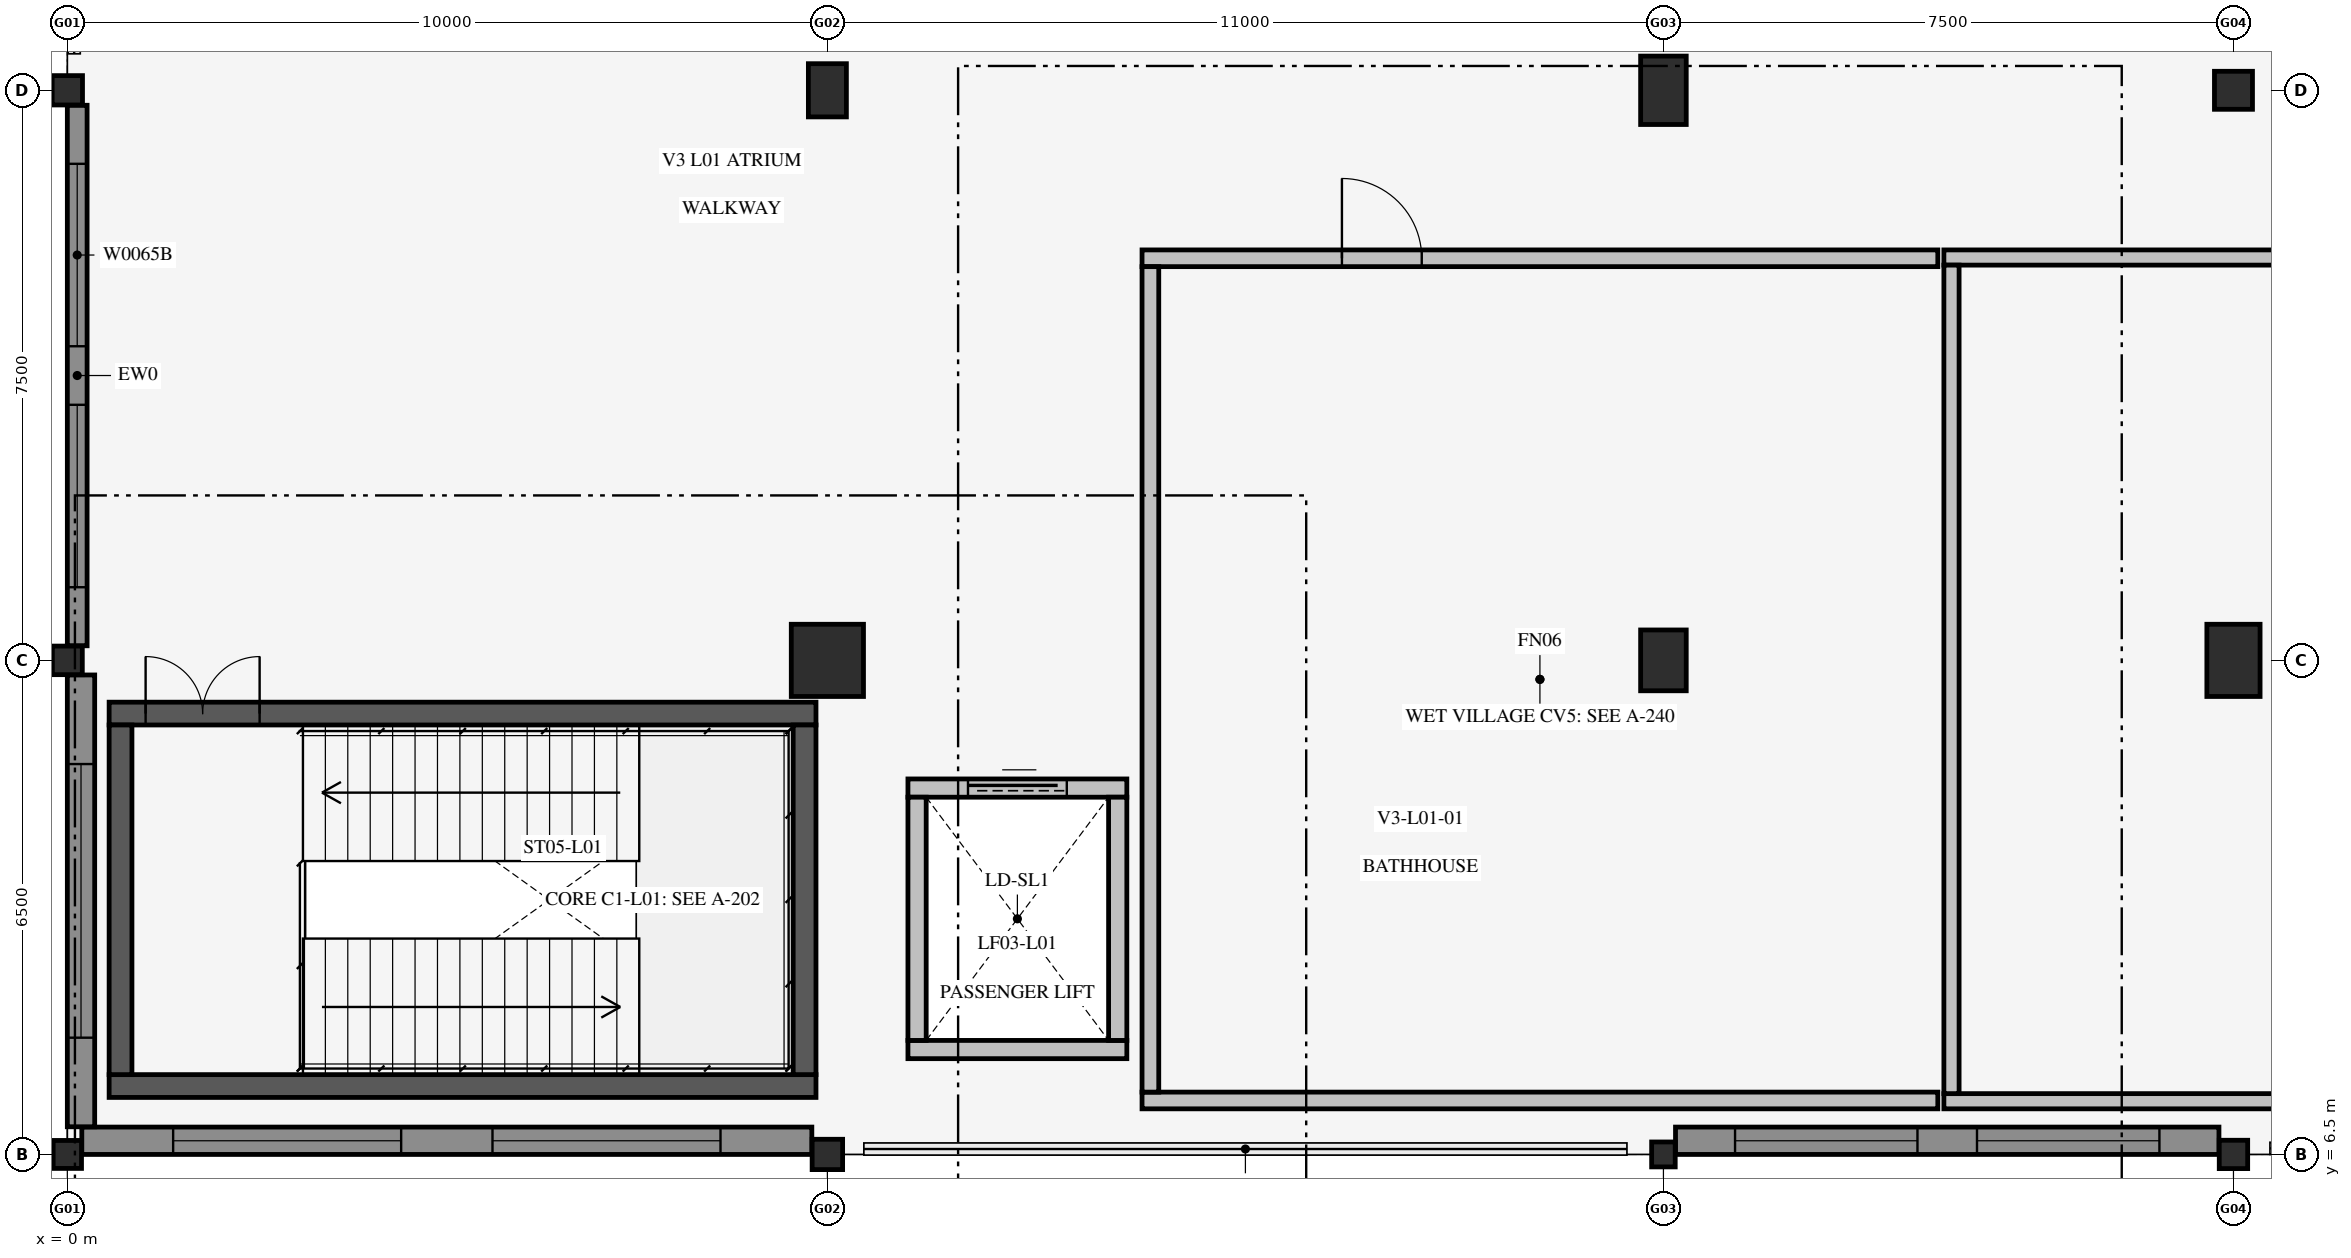
"""IFC4 building model, lengths in metres.
Left out: names, types, materials, properties, quantities, classifications, styles, units other than length and angle.
Written with IfcOpenShell. Run it as: python <this file> out.ifc"""

import sys

from ifc_helpers import new_model, si_unit, direction, frame, frame_2d, origin, origin_2d, place, context, subcontext, project, spatial, rectangle, circle, i_section, extrude, element, fill, save


model = new_model("IFC4")
c1 = context("Model", 3, precision=1e-05, world=origin(), true_north=direction((0.0, 1.0)))
c2 = subcontext(c1, "Body", "Model", "MODEL_VIEW")
j1 = project(units=[si_unit("LENGTHUNIT", "METRE"), si_unit("PLANEANGLEUNIT", "RADIAN")], contexts=[c1])
p1 = place(None, origin())
s1 = spatial("IfcSite", under=j1, at=p1, CompositionType="ELEMENT")
p2 = place(p1, origin())
s2 = spatial("IfcBuilding", under=s1, at=p2, CompositionType="ELEMENT")
p3 = place(p2, frame((0.0, 0.0, 5.4)))
s3 = spatial("IfcBuildingStorey", under=s2, at=p3, CompositionType="ELEMENT", Elevation=5.4)
p4 = place(p3, frame((0.55, 7.4, 0.0), z_axis=(0.0, 0.0, 1.0), x_axis=(1.0, 0.0, 0.0)))
e1 = element("IfcWall", 1, at=p4, inside=s3, PredefinedType="SHEAR", context=c2, shape_type="SweptSolid", body=[
    extrude(rectangle(XDim=9.3, YDim=0.3, at=frame_2d((4.65, 0.0))), origin(), (0.0, 0.0, 1.0), 4.635),
])
p5 = place(p3, frame((0.55, 12.3, 0.0), z_axis=(0.0, 0.0, 1.0), x_axis=(1.0, 0.0, 0.0)))
e2 = element("IfcWall", 2, at=p5, inside=s3, PredefinedType="SHEAR", context=c2, shape_type="SweptSolid", body=[
    extrude(rectangle(XDim=9.3, YDim=0.3, at=frame_2d((4.65, 0.0))), origin(), (0.0, 0.0, 1.0), 4.635),
])
p6 = place(p5, frame((0.48, 0.0, 0.0)))
e3 = element("IfcOpeningElement", 3, at=p6, cuts=e2, PredefinedType="OPENING", context=c2, shape_type="SweptSolid", body=[
    extrude(rectangle(XDim=1.5, YDim=2.3, at=frame_2d((0.75, 1.15))), frame((0.0, 0.162, 0.0), z_axis=(0.0, -1.0, 0.0), x_axis=(1.0, 0.0, 0.0)), (0.0, 0.0, 1.0), 0.324),
])
for number, where, z_axis, x_axis in (
    (4, (0.7, 7.55, 0.0), (0.0, 0.0, 1.0), (0.0, 1.0, 0.0)),
    (5, (9.7, 7.55, 0.0), (0.0, 0.0, 1.0), (0.0, 1.0, 0.0)),
):
    element("IfcWall", number, at=place(p3, frame(where, z_axis=z_axis, x_axis=x_axis)), inside=s3, PredefinedType="SHEAR", context=c2, shape_type="SweptSolid", body=[
        extrude(rectangle(XDim=4.6, YDim=0.3, at=frame_2d((2.3, 0.0))), origin(), (0.0, 0.0, 1.0), 4.635),
    ])
p7 = place(p3, frame((11.06, 7.88, 0.0), z_axis=(0.0, 0.0, 1.0), x_axis=(1.0, 0.0, 0.0)))
e6 = element("IfcWall", 6, at=p7, inside=s3, PredefinedType="SOLIDWALL", context=c2, shape_type="SweptSolid", body=[
    extrude(rectangle(XDim=2.88, YDim=0.24, at=frame_2d((1.44, 0.0))), origin(), (0.0, 0.0, 1.0), 3.45),
])
p8 = place(p3, frame((11.06, 11.32, 0.0), z_axis=(0.0, 0.0, 1.0), x_axis=(1.0, 0.0, 0.0)))
e7 = element("IfcWall", 7, at=p8, inside=s3, PredefinedType="SOLIDWALL", context=c2, shape_type="SweptSolid", body=[
    extrude(rectangle(XDim=2.88, YDim=0.24, at=frame_2d((1.44, 0.0))), origin(), (0.0, 0.0, 1.0), 3.45),
])
p9 = place(p8, frame((0.79, 0.0, 0.0)))
e8 = element("IfcOpeningElement", 8, at=p9, cuts=e7, PredefinedType="OPENING", context=c2, shape_type="SweptSolid", body=[
    extrude(rectangle(XDim=1.3, YDim=2.25, at=frame_2d((0.65, 1.125))), frame((0.0, 0.132, 0.0), z_axis=(0.0, -1.0, 0.0), x_axis=(1.0, 0.0, 0.0)), (0.0, 0.0, 1.0), 0.264),
])
for number, where, z_axis, x_axis in (
    (9, (11.18, 8.0, 0.0), (0.0, 0.0, 1.0), (0.0, 1.0, 0.0)),
    (10, (13.82, 8.0, 0.0), (0.0, 0.0, 1.0), (0.0, 1.0, 0.0)),
):
    element("IfcWall", number, at=place(p3, frame(where, z_axis=z_axis, x_axis=x_axis)), inside=s3, PredefinedType="SOLIDWALL", context=c2, shape_type="SweptSolid", body=[
        extrude(rectangle(XDim=3.2, YDim=0.24, at=frame_2d((1.6, 0.0))), origin(), (0.0, 0.0, 1.0), 3.45),
    ])
p10 = place(p3, frame((0.0, 6.5, 0.0), z_axis=(0.0, 0.0, 1.0), x_axis=(1.0, 0.0, 0.0)))
e11 = element("IfcColumn", 11, at=p10, inside=s3, PredefinedType="COLUMN", context=c2, shape_type="SweptSolid", body=[
    extrude(i_section(OverallWidth=0.373, OverallDepth=0.368, WebThickness=0.015, FlangeThickness=0.024, FilletRadius=0.014, at=origin_2d()), origin(), (0.0, 0.0, 1.0), 4.6),
])
p11 = place(p3, frame((0.0, 13.0, 0.0), z_axis=(0.0, 0.0, 1.0), x_axis=(1.0, 0.0, 0.0)))
e12 = element("IfcColumn", 12, at=p11, inside=s3, PredefinedType="COLUMN", context=c2, shape_type="SweptSolid", body=[
    extrude(i_section(OverallWidth=0.394, OverallDepth=0.376, WebThickness=0.017, FlangeThickness=0.028, FilletRadius=0.014, at=origin_2d()), origin(), (0.0, 0.0, 1.0), 4.6),
])
p12 = place(p3, frame((0.0, 20.5, 0.0), z_axis=(0.0, 0.0, 1.0), x_axis=(1.0, 0.0, 0.0)))
e13 = element("IfcColumn", 13, at=p12, inside=s3, PredefinedType="COLUMN", context=c2, shape_type="SweptSolid", body=[
    extrude(i_section(OverallWidth=0.399, OverallDepth=0.386, WebThickness=0.021, FlangeThickness=0.033, FilletRadius=0.014, at=origin_2d()), origin(), (0.0, 0.0, 1.0), 4.6),
])
p13 = place(p3, frame((10.0, 6.5, 0.0), z_axis=(0.0, 0.0, 1.0), x_axis=(1.0, 0.0, 0.0)))
e14 = element("IfcColumn", 14, at=p13, inside=s3, PredefinedType="COLUMN", context=c2, shape_type="SweptSolid", body=[
    extrude(i_section(OverallWidth=0.401, OverallDepth=0.399, WebThickness=0.025, FlangeThickness=0.04, FilletRadius=0.014, at=origin_2d()), origin(), (0.0, 0.0, 1.0), 4.6),
])
p14 = place(p3, frame((10.0, 13.0, 0.0), z_axis=(0.0, 0.0, 1.0), x_axis=(1.0, 0.0, 0.0)))
e15 = element("IfcColumn", 15, at=p14, inside=s3, PredefinedType="COLUMN", context=c2, shape_type="SweptSolid", body=[
    extrude(rectangle(XDim=0.95, YDim=0.95, at=origin_2d()), origin(), (0.0, 0.0, 1.0), 4.6),
])
p15 = place(p3, frame((10.0, 20.5, 0.0), z_axis=(0.0, 0.0, 1.0), x_axis=(1.0, 0.0, 0.0)))
e16 = element("IfcColumn", 16, at=p15, inside=s3, PredefinedType="COLUMN", context=c2, shape_type="SweptSolid", body=[
    extrude(rectangle(XDim=0.5, YDim=0.7, at=origin_2d()), origin(), (0.0, 0.0, 1.0), 4.6),
])
p16 = place(p3, frame((21.0, 6.5, 0.0), z_axis=(0.0, 0.0, 1.0), x_axis=(1.0, 0.0, 0.0)))
e17 = element("IfcColumn", 17, at=p16, inside=s3, PredefinedType="COLUMN", context=c2, shape_type="SweptSolid", body=[
    extrude(i_section(OverallWidth=0.31, OverallDepth=0.328, WebThickness=0.015, FlangeThickness=0.025, FilletRadius=0.014, at=origin_2d()), origin(), (0.0, 0.0, 1.0), 4.6),
])
p17 = place(p3, frame((21.0, 13.0, 0.0), z_axis=(0.0, 0.0, 1.0), x_axis=(1.0, 0.0, 0.0)))
e18 = element("IfcColumn", 18, at=p17, inside=s3, PredefinedType="COLUMN", context=c2, shape_type="SweptSolid", body=[
    extrude(rectangle(XDim=0.6, YDim=0.8, at=origin_2d()), origin(), (0.0, 0.0, 1.0), 4.6),
])
p18 = place(p3, frame((21.0, 20.5, 0.0), z_axis=(0.0, 0.0, 1.0), x_axis=(1.0, 0.0, 0.0)))
e19 = element("IfcColumn", 19, at=p18, inside=s3, PredefinedType="COLUMN", context=c2, shape_type="SweptSolid", body=[
    extrude(rectangle(XDim=0.6, YDim=0.9, at=origin_2d()), origin(), (0.0, 0.0, 1.0), 4.6),
])
p19 = place(p3, frame((28.5, 6.5, 0.0), z_axis=(0.0, 0.0, 1.0), x_axis=(1.0, 0.0, 0.0)))
e20 = element("IfcColumn", 20, at=p19, inside=s3, PredefinedType="COLUMN", context=c2, shape_type="SweptSolid", body=[
    extrude(i_section(OverallWidth=0.374, OverallDepth=0.373, WebThickness=0.016, FlangeThickness=0.026, FilletRadius=0.014, at=origin_2d()), origin(), (0.0, 0.0, 1.0), 4.6),
])
p20 = place(p3, frame((28.5, 13.0, 0.0), z_axis=(0.0, 0.0, 1.0), x_axis=(1.0, 0.0, 0.0)))
e21 = element("IfcColumn", 21, at=p20, inside=s3, PredefinedType="COLUMN", context=c2, shape_type="SweptSolid", body=[
    extrude(rectangle(XDim=0.7, YDim=0.95, at=origin_2d()), origin(), (0.0, 0.0, 1.0), 4.6),
])
p21 = place(p3, frame((28.5, 20.5, 0.0), z_axis=(0.0, 0.0, 1.0), x_axis=(1.0, 0.0, 0.0)))
e22 = element("IfcColumn", 22, at=p21, inside=s3, PredefinedType="COLUMN", context=c2, shape_type="SweptSolid", body=[
    extrude(circle(Radius=0.25, at=origin_2d()), origin(), (0.0, 0.0, 1.0), 4.6),
])
p22 = place(p3, frame((14.14, 7.21, 0.0), z_axis=(0.0, 0.0, 1.0), x_axis=(1.0, 0.0, 0.0)))
e23 = element("IfcWall", 23, at=p22, inside=s3, PredefinedType="PLUMBINGWALL", context=c2, shape_type="SweptSolid", body=[
    extrude(rectangle(XDim=10.47, YDim=0.22, at=frame_2d((5.235, 0.0))), origin(), (0.0, 0.0, 1.0), 4.435),
])
p23 = place(p3, frame((14.14, 18.29, 0.0), z_axis=(0.0, 0.0, 1.0), x_axis=(1.0, 0.0, 0.0)))
e24 = element("IfcWall", 24, at=p23, inside=s3, PredefinedType="PLUMBINGWALL", context=c2, shape_type="SweptSolid", body=[
    extrude(rectangle(XDim=10.47, YDim=0.22, at=frame_2d((5.235, 0.0))), origin(), (0.0, 0.0, 1.0), 4.435),
])
p24 = place(p23, frame((2.63, 0.0, 0.0)))
e25 = element("IfcOpeningElement", 25, at=p24, cuts=e24, PredefinedType="OPENING", context=c2, shape_type="SweptSolid", body=[
    extrude(rectangle(XDim=1.05, YDim=2.15, at=frame_2d((0.525, 1.075))), frame((0.0, 0.122, 0.0), z_axis=(0.0, -1.0, 0.0), x_axis=(1.0, 0.0, 0.0)), (0.0, 0.0, 1.0), 0.244),
])
p25 = place(p3, frame((14.25, 7.32, 0.0), z_axis=(0.0, 0.0, 1.0), x_axis=(0.0, 1.0, 0.0)))
e26 = element("IfcWall", 26, at=p25, inside=s3, PredefinedType="PLUMBINGWALL", context=c2, shape_type="SweptSolid", body=[
    extrude(rectangle(XDim=10.86, YDim=0.22, at=frame_2d((5.43, 0.0))), origin(), (0.0, 0.0, 1.0), 4.435),
])
p26 = place(p3, frame((24.69, 7.2, 0.0), z_axis=(0.0, 0.0, 1.0), x_axis=(1.0, 0.0, 0.0)))
e27 = element("IfcWall", 27, at=p26, inside=s3, PredefinedType="PLUMBINGWALL", context=c2, shape_type="SweptSolid", body=[
    extrude(rectangle(XDim=10.47, YDim=0.2, at=frame_2d((5.235, 0.0))), origin(), (0.0, 0.0, 1.0), 4.435),
])
p27 = place(p3, frame((24.69, 18.3, 0.0), z_axis=(0.0, 0.0, 1.0), x_axis=(1.0, 0.0, 0.0)))
e28 = element("IfcWall", 28, at=p27, inside=s3, PredefinedType="PLUMBINGWALL", context=c2, shape_type="SweptSolid", body=[
    extrude(rectangle(XDim=10.47, YDim=0.2, at=frame_2d((5.235, 0.0))), origin(), (0.0, 0.0, 1.0), 4.435),
])
p28 = place(p27, frame((6.752, 0.0, 0.0)))
e29 = element("IfcOpeningElement", 29, at=p28, cuts=e28, PredefinedType="OPENING", context=c2, shape_type="SweptSolid", body=[
    extrude(rectangle(XDim=1.1, YDim=2.25, at=frame_2d((0.55, 1.125))), frame((0.0, 0.112, 0.0), z_axis=(0.0, -1.0, 0.0), x_axis=(1.0, 0.0, 0.0)), (0.0, 0.0, 1.0), 0.224),
])
p29 = place(p3, frame((24.79, 7.3, 0.0), z_axis=(0.0, 0.0, 1.0), x_axis=(0.0, 1.0, 0.0)))
e30 = element("IfcWall", 30, at=p29, inside=s3, PredefinedType="PLUMBINGWALL", context=c2, shape_type="SweptSolid", body=[
    extrude(rectangle(XDim=10.9, YDim=0.2, at=frame_2d((5.45, 0.0))), origin(), (0.0, 0.0, 1.0), 4.435),
])
p30 = place(p3, frame((0.19, 6.68, 0.0), z_axis=(0.0, 0.0, 1.0), x_axis=(1.0, 0.0, 0.0)))
e31 = element("IfcWall", 31, at=p30, inside=s3, PredefinedType="SOLIDWALL", context=c2, shape_type="SweptSolid", body=[
    extrude(rectangle(XDim=9.605, YDim=0.36, at=frame_2d((4.802, 0.0))), origin(), (0.0, 0.0, 1.0), 4.11),
])
p31 = place(p30, frame((1.202, 0.0, 0.95)))
e32 = element("IfcOpeningElement", 32, at=p31, cuts=e31, PredefinedType="OPENING", context=c2, shape_type="SweptSolid", body=[
    extrude(rectangle(XDim=3.0, YDim=1.5, at=frame_2d((1.5, 0.75))), frame((0.0, 0.192, 0.0), z_axis=(0.0, -1.0, 0.0), x_axis=(1.0, 0.0, 0.0)), (0.0, 0.0, 1.0), 0.384),
])
p32 = place(p30, frame((5.403, 0.0, 0.95)))
e33 = element("IfcOpeningElement", 33, at=p32, cuts=e31, PredefinedType="OPENING", context=c2, shape_type="SweptSolid", body=[
    extrude(rectangle(XDim=3.0, YDim=1.5, at=frame_2d((1.5, 0.75))), frame((0.0, 0.192, 0.0), z_axis=(0.0, -1.0, 0.0), x_axis=(1.0, 0.0, 0.0)), (0.0, 0.0, 1.0), 0.384),
])
p33 = place(p3, frame((21.159, 6.68, 0.0), z_axis=(0.0, 0.0, 1.0), x_axis=(1.0, 0.0, 0.0)))
e34 = element("IfcWall", 34, at=p33, inside=s3, PredefinedType="SOLIDWALL", context=c2, shape_type="SweptSolid", body=[
    extrude(rectangle(XDim=7.15, YDim=0.36, at=frame_2d((3.575, 0.0))), origin(), (0.0, 0.0, 1.0), 3.958),
])
p34 = place(p33, frame((0.783, 0.0, 0.95)))
e35 = element("IfcOpeningElement", 35, at=p34, cuts=e34, PredefinedType="OPENING", context=c2, shape_type="SweptSolid", body=[
    extrude(rectangle(XDim=2.4, YDim=1.8, at=frame_2d((1.2, 0.9))), frame((0.0, 0.192, 0.0), z_axis=(0.0, -1.0, 0.0), x_axis=(1.0, 0.0, 0.0)), (0.0, 0.0, 1.0), 0.384),
])
p35 = place(p33, frame((3.967, 0.0, 0.95)))
e36 = element("IfcOpeningElement", 36, at=p35, cuts=e34, PredefinedType="OPENING", context=c2, shape_type="SweptSolid", body=[
    extrude(rectangle(XDim=2.4, YDim=1.8, at=frame_2d((1.2, 0.9))), frame((0.0, 0.192, 0.0), z_axis=(0.0, -1.0, 0.0), x_axis=(1.0, 0.0, 0.0)), (0.0, 0.0, 1.0), 0.384),
])
p36 = place(p3, frame((0.18, 6.864, 0.0), z_axis=(0.0, 0.0, 1.0), x_axis=(0.0, 1.0, 0.0)))
e37 = element("IfcWall", 37, at=p36, inside=s3, PredefinedType="SOLIDWALL", context=c2, shape_type="SweptSolid", body=[
    extrude(rectangle(XDim=5.944, YDim=0.36, at=frame_2d((2.972, 0.0))), origin(), (0.0, 0.0, 1.0), 4.034),
])
p37 = place(p36, frame((1.172, 0.0, 0.95)))
e38 = element("IfcOpeningElement", 38, at=p37, cuts=e37, PredefinedType="OPENING", context=c2, shape_type="SweptSolid", body=[
    extrude(rectangle(XDim=3.6, YDim=1.8, at=frame_2d((1.8, 0.9))), frame((0.0, 0.192, 0.0), z_axis=(0.0, -1.0, 0.0), x_axis=(1.0, 0.0, 0.0)), (0.0, 0.0, 1.0), 0.384),
])
p38 = place(p3, frame((0.13, 13.192, 0.0), z_axis=(0.0, 0.0, 1.0), x_axis=(0.0, 1.0, 0.0)))
e39 = element("IfcWall", 39, at=p38, inside=s3, PredefinedType="SOLIDWALL", context=c2, shape_type="SweptSolid", body=[
    extrude(rectangle(XDim=7.111, YDim=0.26, at=frame_2d((3.556, 0.0))), origin(), (0.0, 0.0, 1.0), 3.958),
])
p39 = place(p38, frame((0.77, 0.0, 0.95)))
e40 = element("IfcOpeningElement", 40, at=p39, cuts=e39, PredefinedType="OPENING", context=c2, shape_type="SweptSolid", body=[
    extrude(rectangle(XDim=2.4, YDim=2.1, at=frame_2d((1.2, 1.05))), frame((0.0, 0.142, 0.0), z_axis=(0.0, -1.0, 0.0), x_axis=(1.0, 0.0, 0.0)), (0.0, 0.0, 1.0), 0.284),
])
p40 = place(p38, frame((3.941, 0.0, 0.95)))
e41 = element("IfcOpeningElement", 41, at=p40, cuts=e39, PredefinedType="OPENING", context=c2, shape_type="SweptSolid", body=[
    extrude(rectangle(XDim=2.4, YDim=2.1, at=frame_2d((1.2, 1.05))), frame((0.0, 0.142, 0.0), z_axis=(0.0, -1.0, 0.0), x_axis=(1.0, 0.0, 0.0)), (0.0, 0.0, 1.0), 0.284),
])
p41 = place(p6, frame((1.5, 0.0, 0.0), z_axis=(0.0, 0.0, 1.0), x_axis=(-1.0, 0.0, 0.0)))
e42 = element("IfcDoor", 42, at=p41, inside=s3, OperationType="DOUBLE_DOOR_SINGLE_SWING", PredefinedType="DOOR", context=c2, shape_type="SweptSolid", body=[
    extrude(rectangle(XDim=1.5, YDim=2.3, at=frame_2d((0.75, 1.15))), frame((0.0, 0.025, 0.0), z_axis=(0.0, -1.0, 0.0), x_axis=(1.0, 0.0, 0.0)), (0.0, 0.0, 1.0), 0.05),
])
fill(e3, e42)
p42 = place(p24, frame((1.05, 0.0, 0.0), z_axis=(0.0, 0.0, 1.0), x_axis=(-1.0, 0.0, 0.0)))
e43 = element("IfcDoor", 43, at=p42, inside=s3, OperationType="SINGLE_SWING_LEFT", PredefinedType="DOOR", context=c2, shape_type="SweptSolid", body=[
    extrude(rectangle(XDim=1.05, YDim=2.15, at=frame_2d((0.525, 1.075))), frame((0.0, 0.025, 0.0), z_axis=(0.0, -1.0, 0.0), x_axis=(1.0, 0.0, 0.0)), (0.0, 0.0, 1.0), 0.05),
])
fill(e25, e43)
p43 = place(p31, origin())
e44 = element("IfcWindow", 44, at=p43, inside=s3, PartitioningType="SINGLE_PANEL", PredefinedType="WINDOW", context=c2, shape_type="SweptSolid", body=[
    extrude(rectangle(XDim=3.0, YDim=1.5, at=frame_2d((1.5, 0.75))), frame((0.0, 0.03, 0.0), z_axis=(0.0, -1.0, 0.0), x_axis=(1.0, 0.0, 0.0)), (0.0, 0.0, 1.0), 0.06),
])
fill(e32, e44)
p44 = place(p32, origin())
e45 = element("IfcWindow", 45, at=p44, inside=s3, PartitioningType="SINGLE_PANEL", PredefinedType="WINDOW", context=c2, shape_type="SweptSolid", body=[
    extrude(rectangle(XDim=3.0, YDim=1.5, at=frame_2d((1.5, 0.75))), frame((0.0, 0.03, 0.0), z_axis=(0.0, -1.0, 0.0), x_axis=(1.0, 0.0, 0.0)), (0.0, 0.0, 1.0), 0.06),
])
fill(e33, e45)
p45 = place(p34, origin())
e46 = element("IfcWindow", 46, at=p45, inside=s3, PartitioningType="SINGLE_PANEL", PredefinedType="WINDOW", context=c2, shape_type="SweptSolid", body=[
    extrude(rectangle(XDim=2.4, YDim=1.8, at=frame_2d((1.2, 0.9))), frame((0.0, 0.03, 0.0), z_axis=(0.0, -1.0, 0.0), x_axis=(1.0, 0.0, 0.0)), (0.0, 0.0, 1.0), 0.06),
])
fill(e35, e46)
p46 = place(p35, origin())
e47 = element("IfcWindow", 47, at=p46, inside=s3, PartitioningType="SINGLE_PANEL", PredefinedType="WINDOW", context=c2, shape_type="SweptSolid", body=[
    extrude(rectangle(XDim=2.4, YDim=1.8, at=frame_2d((1.2, 0.9))), frame((0.0, 0.03, 0.0), z_axis=(0.0, -1.0, 0.0), x_axis=(1.0, 0.0, 0.0)), (0.0, 0.0, 1.0), 0.06),
])
fill(e36, e47)
p47 = place(p37, origin())
e48 = element("IfcWindow", 48, at=p47, inside=s3, PartitioningType="SINGLE_PANEL", PredefinedType="WINDOW", context=c2, shape_type="SweptSolid", body=[
    extrude(rectangle(XDim=3.6, YDim=1.8, at=frame_2d((1.8, 0.9))), frame((0.0, 0.03, 0.0), z_axis=(0.0, -1.0, 0.0), x_axis=(1.0, 0.0, 0.0)), (0.0, 0.0, 1.0), 0.06),
])
fill(e38, e48)
p48 = place(p39, origin())
e49 = element("IfcWindow", 49, at=p48, inside=s3, PartitioningType="SINGLE_PANEL", PredefinedType="WINDOW", context=c2, shape_type="SweptSolid", body=[
    extrude(rectangle(XDim=2.4, YDim=2.1, at=frame_2d((1.2, 1.05))), frame((0.0, 0.03, 0.0), z_axis=(0.0, -1.0, 0.0), x_axis=(1.0, 0.0, 0.0)), (0.0, 0.0, 1.0), 0.06),
])
fill(e40, e49)
p49 = place(p40, origin())
e50 = element("IfcWindow", 50, at=p49, inside=s3, PartitioningType="SINGLE_PANEL", PredefinedType="WINDOW", context=c2, shape_type="SweptSolid", body=[
    extrude(rectangle(XDim=2.4, YDim=2.1, at=frame_2d((1.2, 1.05))), frame((0.0, 0.03, 0.0), z_axis=(0.0, -1.0, 0.0), x_axis=(1.0, 0.0, 0.0)), (0.0, 0.0, 1.0), 0.06),
])
fill(e41, e50)
p50 = place(p9, origin())
e51 = element("IfcDoor", 51, at=p50, inside=s3, OperationType="SLIDING_TO_RIGHT", PredefinedType="USERDEFINED", context=c2, shape_type="SweptSolid", body=[
    extrude(rectangle(XDim=1.3, YDim=2.25, at=frame_2d((0.65, 1.125))), frame((0.0, 0.025, 0.0), z_axis=(0.0, -1.0, 0.0), x_axis=(1.0, 0.0, 0.0)), (0.0, 0.0, 1.0), 0.05),
])
fill(e8, e51)
save(model, sys.argv[1])
